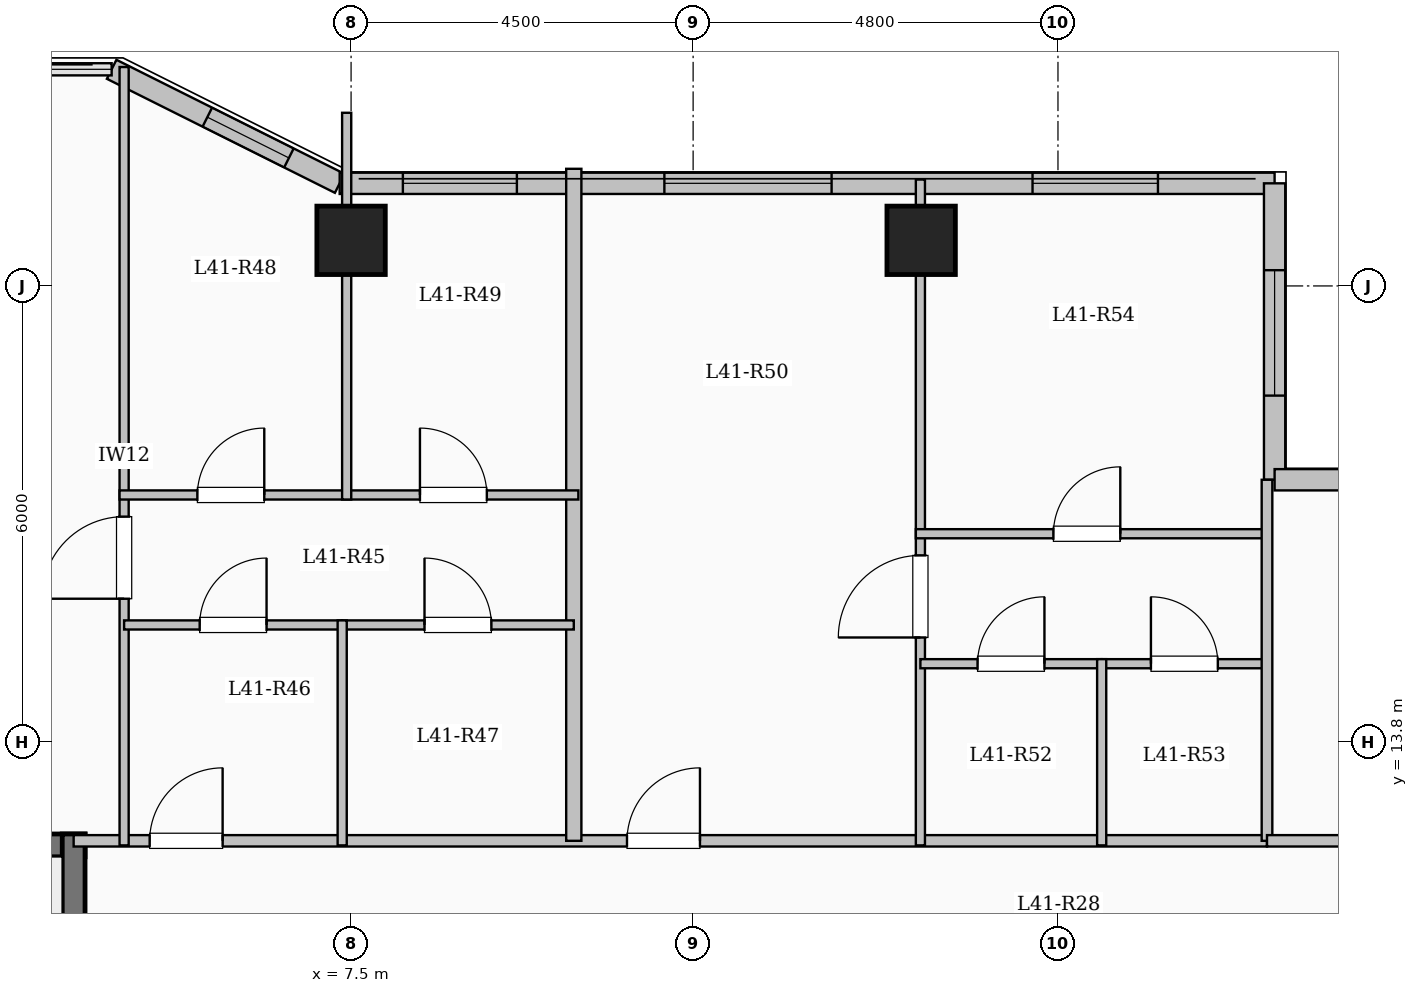
"""IFC4 building model, lengths in metres.
Left out: names, types, materials, properties, quantities, classifications, styles, units other than length and angle.
Written with IfcOpenShell. Run it as: python <this file> out.ifc"""

import sys

from ifc_helpers import new_model, si_unit, direction, frame, frame_2d, origin, origin_2d, place, context, subcontext, project, spatial, rectangle, extrude, element, fill, save


model = new_model("IFC4")
c1 = context("Model", 3, precision=1e-05, world=origin(), true_north=direction((0.0, 1.0)))
c2 = subcontext(c1, "Body", "Model", "MODEL_VIEW")
j1 = project(units=[si_unit("LENGTHUNIT", "METRE"), si_unit("PLANEANGLEUNIT", "RADIAN")], contexts=[c1])
p1 = place(None, origin())
s1 = spatial("IfcSite", under=j1, at=p1, CompositionType="ELEMENT")
p2 = place(p1, origin())
s2 = spatial("IfcBuilding", under=s1, at=p2, CompositionType="ELEMENT")
p3 = place(p2, frame((0.0, 0.0, 152.7)))
s3 = spatial("IfcBuildingStorey", under=s2, at=p3, CompositionType="ELEMENT", Elevation=152.7)
for number, where, z_axis, x_axis in (
    (1, (7.5, 20.4, 0.0), (0.0, 0.0, 1.0), (1.0, 0.0, 0.0)),
    (2, (15.0, 20.4, 0.0), (0.0, 0.0, 1.0), (1.0, 0.0, 0.0)),
):
    element("IfcColumn", number, at=place(p3, frame(where, z_axis=z_axis, x_axis=x_axis)), inside=s3, PredefinedType="COLUMN", context=c2, shape_type="SweptSolid", body=[
        extrude(rectangle(XDim=0.9, YDim=0.9, at=origin_2d()), origin(), (0.0, 0.0, 1.0), 3.35),
    ])
p4 = place(p3, frame((4.35, 22.65, 0.0), z_axis=(0.0, 0.0, 1.0), x_axis=(0.894427191, -0.4472135955, 0.0)))
e3 = element("IfcWall", 3, at=p4, inside=s3, PredefinedType="SOLIDWALL", context=c2, shape_type="SweptSolid", body=[
    extrude(rectangle(XDim=3.354, YDim=0.28, at=frame_2d((1.677, 0.0))), origin(), (0.0, 0.0, 1.0), 3.1),
])
p5 = place(p4, frame((1.407, 0.0, 0.95)))
e4 = element("IfcOpeningElement", 4, at=p5, cuts=e3, PredefinedType="OPENING", context=c2, shape_type="SweptSolid", body=[
    extrude(rectangle(XDim=1.2, YDim=1.5, at=frame_2d((0.6, 0.75))), frame((0.0, 0.15, 0.0), z_axis=(0.0, -1.0, 0.0), x_axis=(1.0, 0.0, 0.0)), (0.0, 0.0, 1.0), 0.3),
])
p6 = place(p3, frame((7.35, 21.15, 0.0), z_axis=(0.0, 0.0, 1.0), x_axis=(1.0, 0.0, 0.0)))
e5 = element("IfcWall", 5, at=p6, inside=s3, PredefinedType="SOLIDWALL", context=c2, shape_type="SweptSolid", body=[
    extrude(rectangle(XDim=12.3, YDim=0.28, at=frame_2d((6.15, 0.0))), origin(), (0.0, 0.0, 1.0), 3.1),
])
p7 = place(p6, frame((0.831, 0.0, 0.9)))
e6 = element("IfcOpeningElement", 6, at=p7, cuts=e5, PredefinedType="OPENING", context=c2, shape_type="SweptSolid", body=[
    extrude(rectangle(XDim=1.5, YDim=1.65, at=frame_2d((0.75, 0.825))), frame((0.0, 0.15, 0.0), z_axis=(0.0, -1.0, 0.0), x_axis=(1.0, 0.0, 0.0)), (0.0, 0.0, 1.0), 0.3),
])
p8 = place(p6, frame((4.272, 0.0, 0.9)))
e7 = element("IfcOpeningElement", 7, at=p8, cuts=e5, PredefinedType="OPENING", context=c2, shape_type="SweptSolid", body=[
    extrude(rectangle(XDim=2.2, YDim=1.75, at=frame_2d((1.1, 0.875))), frame((0.0, 0.15, 0.0), z_axis=(0.0, -1.0, 0.0), x_axis=(1.0, 0.0, 0.0)), (0.0, 0.0, 1.0), 0.3),
])
p9 = place(p6, frame((9.115, 0.0, 0.9)))
e8 = element("IfcOpeningElement", 8, at=p9, cuts=e5, PredefinedType="OPENING", context=c2, shape_type="SweptSolid", body=[
    extrude(rectangle(XDim=1.65, YDim=1.6, at=frame_2d((0.825, 0.8))), frame((0.0, 0.15, 0.0), z_axis=(0.0, -1.0, 0.0), x_axis=(1.0, 0.0, 0.0)), (0.0, 0.0, 1.0), 0.3),
])
p10 = place(p3, frame((19.65, 21.15, 0.0), z_axis=(0.0, 0.0, 1.0), x_axis=(0.0, -1.0, 0.0)))
e9 = element("IfcWall", 9, at=p10, inside=s3, PredefinedType="SOLIDWALL", context=c2, shape_type="SweptSolid", body=[
    extrude(rectangle(XDim=3.9, YDim=0.28, at=frame_2d((1.95, 0.0))), origin(), (0.0, 0.0, 1.0), 3.1),
])
p11 = place(p10, frame((1.143, 0.0, 0.9)))
e10 = element("IfcOpeningElement", 10, at=p11, cuts=e9, PredefinedType="OPENING", context=c2, shape_type="SweptSolid", body=[
    extrude(rectangle(XDim=1.65, YDim=1.6, at=frame_2d((0.825, 0.8))), frame((0.0, 0.15, 0.0), z_axis=(0.0, -1.0, 0.0), x_axis=(1.0, 0.0, 0.0)), (0.0, 0.0, 1.0), 0.3),
])
p12 = place(p3, frame((19.65, 17.25, 0.0), z_axis=(0.0, 0.0, 1.0), x_axis=(1.0, 0.0, 0.0)))
e11 = element("IfcWall", 11, at=p12, inside=s3, PredefinedType="SOLIDWALL", context=c2, shape_type="SweptSolid", body=[
    extrude(rectangle(XDim=5.4, YDim=0.28, at=frame_2d((2.7, 0.0))), origin(), (0.0, 0.0, 1.0), 3.1),
])
p13 = place(p12, frame((1.675, 0.0, 0.9)))
e12 = element("IfcOpeningElement", 12, at=p13, cuts=e11, PredefinedType="OPENING", context=c2, shape_type="SweptSolid", body=[
    extrude(rectangle(XDim=2.0, YDim=1.7, at=frame_2d((1.0, 0.85))), frame((0.0, 0.15, 0.0), z_axis=(0.0, -1.0, 0.0), x_axis=(1.0, 0.0, 0.0)), (0.0, 0.0, 1.0), 0.3),
])
p14 = place(p3, frame((-4.0, 12.44, 0.0), z_axis=(0.0, 0.0, 1.0), x_axis=(1.0, 0.0, 0.0)))
e13 = element("IfcWall", 13, at=p14, inside=s3, PredefinedType="SHEAR", context=c2, shape_type="SweptSolid", body=[
    extrude(rectangle(XDim=8.0, YDim=0.3, at=frame_2d((4.0, 0.0))), origin(), (0.0, 0.0, 1.0), 3.35),
])
p15 = place(p3, frame((3.85, 9.0, 0.0), z_axis=(0.0, 0.0, 1.0), x_axis=(0.0, 1.0, 0.0)))
e14 = element("IfcWall", 14, at=p15, inside=s3, PredefinedType="SHEAR", context=c2, shape_type="SweptSolid", body=[
    extrude(rectangle(XDim=3.59, YDim=0.3, at=frame_2d((1.795, 0.0))), origin(), (0.0, 0.0, 1.0), 3.35),
])
p16 = place(p3, frame((3.85, 12.5, 0.0), z_axis=(0.0, 0.0, 1.0), x_axis=(1.0, 0.0, 0.0)))
e15 = element("IfcWall", 15, at=p16, inside=s3, PredefinedType="PARTITIONING", context=c2, shape_type="SweptSolid", body=[
    extrude(rectangle(XDim=15.7, YDim=0.15, at=frame_2d((7.85, 0.0))), origin(), (0.0, 0.0, 1.0), 3.1),
])
p17 = place(p16, frame((1.0, 0.0, 0.0)))
e16 = element("IfcOpeningElement", 16, at=p17, cuts=e15, PredefinedType="OPENING", context=c2, shape_type="SweptSolid", body=[
    extrude(rectangle(XDim=0.96, YDim=2.15, at=frame_2d((0.48, 1.075))), frame((0.0, 0.085, 0.0), z_axis=(0.0, -1.0, 0.0), x_axis=(1.0, 0.0, 0.0)), (0.0, 0.0, 1.0), 0.17),
])
p18 = place(p16, frame((7.28, 0.0, 0.0)))
e17 = element("IfcOpeningElement", 17, at=p18, cuts=e15, PredefinedType="OPENING", context=c2, shape_type="SweptSolid", body=[
    extrude(rectangle(XDim=0.96, YDim=2.15, at=frame_2d((0.48, 1.075))), frame((0.0, 0.085, 0.0), z_axis=(0.0, -1.0, 0.0), x_axis=(1.0, 0.0, 0.0)), (0.0, 0.0, 1.0), 0.17),
])
p19 = place(p3, frame((10.43, 12.5, 0.0), z_axis=(0.0, 0.0, 1.0), x_axis=(0.0, 1.0, 0.0)))
e18 = element("IfcWall", 18, at=p19, inside=s3, PredefinedType="SOLIDWALL", context=c2, shape_type="SweptSolid", body=[
    extrude(rectangle(XDim=8.841, YDim=0.2, at=frame_2d((4.42, 0.0))), origin(), (0.0, 0.0, 1.0), 3.1),
])
p20 = place(p3, frame((4.514, 12.44, 0.0), z_axis=(0.0, 0.0, 1.0), x_axis=(0.0, 1.0, 0.0)))
e19 = element("IfcWall", 19, at=p20, inside=s3, PredefinedType="PARTITIONING", context=c2, shape_type="SweptSolid", body=[
    extrude(rectangle(XDim=10.24, YDim=0.12, at=frame_2d((5.12, 0.0))), origin(), (0.0, 0.0, 1.0), 3.1),
])
p21 = place(p20, frame((3.245, 0.0, 0.0)))
e20 = element("IfcOpeningElement", 20, at=p21, cuts=e19, PredefinedType="OPENING", context=c2, shape_type="SweptSolid", body=[
    extrude(rectangle(XDim=1.08, YDim=2.15, at=frame_2d((0.54, 1.075))), frame((0.0, 0.07, 0.0), z_axis=(0.0, -1.0, 0.0), x_axis=(1.0, 0.0, 0.0)), (0.0, 0.0, 1.0), 0.14),
])
p22 = place(p3, frame((4.514, 15.34, 0.0), z_axis=(0.0, 0.0, 1.0), x_axis=(1.0, 0.0, 0.0)))
e21 = element("IfcWall", 21, at=p22, inside=s3, PredefinedType="PARTITIONING", context=c2, shape_type="SweptSolid", body=[
    extrude(rectangle(XDim=2.869, YDim=0.12, at=frame_2d((1.435, 0.0))), origin(), (0.0, 0.0, 1.0), 3.1),
])
p23 = place(p22, frame((0.994, 0.0, 0.0)))
e22 = element("IfcOpeningElement", 22, at=p23, cuts=e21, PredefinedType="OPENING", context=c2, shape_type="SweptSolid", body=[
    extrude(rectangle(XDim=0.88, YDim=2.1, at=frame_2d((0.44, 1.05))), frame((0.0, 0.07, 0.0), z_axis=(0.0, -1.0, 0.0), x_axis=(1.0, 0.0, 0.0)), (0.0, 0.0, 1.0), 0.14),
])
p24 = place(p3, frame((7.383, 15.34, 0.0), z_axis=(0.0, 0.0, 1.0), x_axis=(1.0, 0.0, 0.0)))
e23 = element("IfcWall", 23, at=p24, inside=s3, PredefinedType="PARTITIONING", context=c2, shape_type="SweptSolid", body=[
    extrude(rectangle(XDim=3.047, YDim=0.12, at=frame_2d((1.523, 0.0))), origin(), (0.0, 0.0, 1.0), 3.1),
])
p25 = place(p24, frame((1.083, 0.0, 0.0)))
e24 = element("IfcOpeningElement", 24, at=p25, cuts=e23, PredefinedType="OPENING", context=c2, shape_type="SweptSolid", body=[
    extrude(rectangle(XDim=0.88, YDim=2.1, at=frame_2d((0.44, 1.05))), frame((0.0, 0.07, 0.0), z_axis=(0.0, -1.0, 0.0), x_axis=(1.0, 0.0, 0.0)), (0.0, 0.0, 1.0), 0.14),
])
p26 = place(p3, frame((4.454, 17.05, 0.0), z_axis=(0.0, 0.0, 1.0), x_axis=(1.0, 0.0, 0.0)))
e25 = element("IfcWall", 25, at=p26, inside=s3, PredefinedType="PARTITIONING", context=c2, shape_type="SweptSolid", body=[
    extrude(rectangle(XDim=6.036, YDim=0.12, at=frame_2d((3.018, 0.0))), origin(), (0.0, 0.0, 1.0), 2.685),
])
p27 = place(p26, frame((1.024, 0.0, 0.0)))
e26 = element("IfcOpeningElement", 26, at=p27, cuts=e25, PredefinedType="OPENING", context=c2, shape_type="SweptSolid", body=[
    extrude(rectangle(XDim=0.88, YDim=2.1, at=frame_2d((0.44, 1.05))), frame((0.0, 0.07, 0.0), z_axis=(0.0, -1.0, 0.0), x_axis=(1.0, 0.0, 0.0)), (0.0, 0.0, 1.0), 0.14),
])
p28 = place(p26, frame((3.952, 0.0, 0.0)))
e27 = element("IfcOpeningElement", 27, at=p28, cuts=e25, PredefinedType="OPENING", context=c2, shape_type="SweptSolid", body=[
    extrude(rectangle(XDim=0.88, YDim=2.1, at=frame_2d((0.44, 1.05))), frame((0.0, 0.07, 0.0), z_axis=(0.0, -1.0, 0.0), x_axis=(1.0, 0.0, 0.0)), (0.0, 0.0, 1.0), 0.14),
])
p29 = place(p3, frame((7.383, 12.44, 0.0), z_axis=(0.0, 0.0, 1.0), x_axis=(0.0, 1.0, 0.0)))
e28 = element("IfcWall", 28, at=p29, inside=s3, PredefinedType="PARTITIONING", context=c2, shape_type="SweptSolid", body=[
    extrude(rectangle(XDim=2.96, YDim=0.12, at=frame_2d((1.48, 0.0))), origin(), (0.0, 0.0, 1.0), 2.585),
])
p30 = place(p3, frame((7.442, 16.99, 0.0), z_axis=(0.0, 0.0, 1.0), x_axis=(0.0, 1.0, 0.0)))
e29 = element("IfcWall", 29, at=p30, inside=s3, PredefinedType="PARTITIONING", context=c2, shape_type="SweptSolid", body=[
    extrude(rectangle(XDim=5.088, YDim=0.12, at=frame_2d((2.544, 0.0))), origin(), (0.0, 0.0, 1.0), 2.585),
])
p31 = place(p3, frame((14.99, 12.44, 0.0), z_axis=(0.0, 0.0, 1.0), x_axis=(0.0, 1.0, 0.0)))
e30 = element("IfcWall", 30, at=p31, inside=s3, PredefinedType="PARTITIONING", context=c2, shape_type="SweptSolid", body=[
    extrude(rectangle(XDim=8.76, YDim=0.12, at=frame_2d((4.38, 0.0))), origin(), (0.0, 0.0, 1.0), 2.585),
])
p32 = place(p31, frame((2.735, 0.0, 0.0)))
e31 = element("IfcOpeningElement", 31, at=p32, cuts=e30, PredefinedType="OPENING", context=c2, shape_type="SweptSolid", body=[
    extrude(rectangle(XDim=1.08, YDim=2.15, at=frame_2d((0.54, 1.075))), frame((0.0, 0.07, 0.0), z_axis=(0.0, -1.0, 0.0), x_axis=(1.0, 0.0, 0.0)), (0.0, 0.0, 1.0), 0.14),
])
p33 = place(p3, frame((14.99, 14.83, 0.0), z_axis=(0.0, 0.0, 1.0), x_axis=(1.0, 0.0, 0.0)))
e32 = element("IfcWall", 32, at=p33, inside=s3, PredefinedType="PARTITIONING", context=c2, shape_type="SweptSolid", body=[
    extrude(rectangle(XDim=2.385, YDim=0.12, at=frame_2d((1.192, 0.0))), origin(), (0.0, 0.0, 1.0), 3.1),
])
p34 = place(p33, frame((0.752, 0.0, 0.0)))
e33 = element("IfcOpeningElement", 33, at=p34, cuts=e32, PredefinedType="OPENING", context=c2, shape_type="SweptSolid", body=[
    extrude(rectangle(XDim=0.88, YDim=2.1, at=frame_2d((0.44, 1.05))), frame((0.0, 0.07, 0.0), z_axis=(0.0, -1.0, 0.0), x_axis=(1.0, 0.0, 0.0)), (0.0, 0.0, 1.0), 0.14),
])
p35 = place(p3, frame((17.375, 14.83, 0.0), z_axis=(0.0, 0.0, 1.0), x_axis=(1.0, 0.0, 0.0)))
e34 = element("IfcWall", 34, at=p35, inside=s3, PredefinedType="PARTITIONING", context=c2, shape_type="SweptSolid", body=[
    extrude(rectangle(XDim=2.175, YDim=0.12, at=frame_2d((1.087, 0.0))), origin(), (0.0, 0.0, 1.0), 3.1),
])
p36 = place(p35, frame((0.648, 0.0, 0.0)))
e35 = element("IfcOpeningElement", 35, at=p36, cuts=e34, PredefinedType="OPENING", context=c2, shape_type="SweptSolid", body=[
    extrude(rectangle(XDim=0.88, YDim=2.1, at=frame_2d((0.44, 1.05))), frame((0.0, 0.07, 0.0), z_axis=(0.0, -1.0, 0.0), x_axis=(1.0, 0.0, 0.0)), (0.0, 0.0, 1.0), 0.14),
])
p37 = place(p3, frame((14.93, 16.54, 0.0), z_axis=(0.0, 0.0, 1.0), x_axis=(1.0, 0.0, 0.0)))
e36 = element("IfcWall", 36, at=p37, inside=s3, PredefinedType="PARTITIONING", context=c2, shape_type="SweptSolid", body=[
    extrude(rectangle(XDim=4.68, YDim=0.12, at=frame_2d((2.34, 0.0))), origin(), (0.0, 0.0, 1.0), 3.1),
])
p38 = place(p37, frame((1.81, 0.0, 0.0)))
e37 = element("IfcOpeningElement", 37, at=p38, cuts=e36, PredefinedType="OPENING", context=c2, shape_type="SweptSolid", body=[
    extrude(rectangle(XDim=0.88, YDim=2.1, at=frame_2d((0.44, 1.05))), frame((0.0, 0.07, 0.0), z_axis=(0.0, -1.0, 0.0), x_axis=(1.0, 0.0, 0.0)), (0.0, 0.0, 1.0), 0.14),
])
p39 = place(p3, frame((17.375, 12.44, 0.0), z_axis=(0.0, 0.0, 1.0), x_axis=(0.0, 1.0, 0.0)))
e38 = element("IfcWall", 38, at=p39, inside=s3, PredefinedType="PARTITIONING", context=c2, shape_type="SweptSolid", body=[
    extrude(rectangle(XDim=2.45, YDim=0.12, at=frame_2d((1.225, 0.0))), origin(), (0.0, 0.0, 1.0), 3.1),
])
p40 = place(p3, frame((19.55, 12.5, 0.0), z_axis=(0.0, 0.0, 1.0), x_axis=(0.0, 1.0, 0.0)))
e39 = element("IfcWall", 39, at=p40, inside=s3, PredefinedType="PARTITIONING", context=c2, shape_type="SweptSolid", body=[
    extrude(rectangle(XDim=4.75, YDim=0.14, at=frame_2d((2.375, 0.0))), origin(), (0.0, 0.0, 1.0), 3.1),
])
p41 = place(p3, frame((19.55, 12.5, 0.0), z_axis=(0.0, 0.0, 1.0), x_axis=(1.0, 0.0, 0.0)))
e40 = element("IfcWall", 40, at=p41, inside=s3, PredefinedType="PARTITIONING", context=c2, shape_type="SweptSolid", body=[
    extrude(rectangle(XDim=5.53, YDim=0.15, at=frame_2d((2.765, 0.0))), origin(), (0.0, 0.0, 1.0), 3.1),
])
p42 = place(p41, frame((2.29, 0.0, 0.0)))
e41 = element("IfcOpeningElement", 41, at=p42, cuts=e40, PredefinedType="OPENING", context=c2, shape_type="SweptSolid", body=[
    extrude(rectangle(XDim=0.95, YDim=2.15, at=frame_2d((0.475, 1.075))), frame((0.0, 0.085, 0.0), z_axis=(0.0, -1.0, 0.0), x_axis=(1.0, 0.0, 0.0)), (0.0, 0.0, 1.0), 0.17),
])
p43 = place(p5, origin())
e42 = element("IfcWindow", 42, at=p43, inside=s3, PartitioningType="SINGLE_PANEL", PredefinedType="WINDOW", context=c2, shape_type="SweptSolid", body=[
    extrude(rectangle(XDim=1.2, YDim=1.5, at=frame_2d((0.6, 0.75))), frame((0.0, 0.03, 0.0), z_axis=(0.0, -1.0, 0.0), x_axis=(1.0, 0.0, 0.0)), (0.0, 0.0, 1.0), 0.06),
])
fill(e4, e42)
p44 = place(p7, origin())
e43 = element("IfcWindow", 43, at=p44, inside=s3, PartitioningType="SINGLE_PANEL", PredefinedType="WINDOW", context=c2, shape_type="SweptSolid", body=[
    extrude(rectangle(XDim=1.5, YDim=1.65, at=frame_2d((0.75, 0.825))), frame((0.0, 0.03, 0.0), z_axis=(0.0, -1.0, 0.0), x_axis=(1.0, 0.0, 0.0)), (0.0, 0.0, 1.0), 0.06),
])
fill(e6, e43)
p45 = place(p8, origin())
e44 = element("IfcWindow", 44, at=p45, inside=s3, PartitioningType="SINGLE_PANEL", PredefinedType="WINDOW", context=c2, shape_type="SweptSolid", body=[
    extrude(rectangle(XDim=2.2, YDim=1.75, at=frame_2d((1.1, 0.875))), frame((0.0, 0.03, 0.0), z_axis=(0.0, -1.0, 0.0), x_axis=(1.0, 0.0, 0.0)), (0.0, 0.0, 1.0), 0.06),
])
fill(e7, e44)
p46 = place(p9, origin())
e45 = element("IfcWindow", 45, at=p46, inside=s3, PartitioningType="SINGLE_PANEL", PredefinedType="WINDOW", context=c2, shape_type="SweptSolid", body=[
    extrude(rectangle(XDim=1.65, YDim=1.6, at=frame_2d((0.825, 0.8))), frame((0.0, 0.03, 0.0), z_axis=(0.0, -1.0, 0.0), x_axis=(1.0, 0.0, 0.0)), (0.0, 0.0, 1.0), 0.06),
])
fill(e8, e45)
p47 = place(p11, origin())
e46 = element("IfcWindow", 46, at=p47, inside=s3, PartitioningType="SINGLE_PANEL", PredefinedType="WINDOW", context=c2, shape_type="SweptSolid", body=[
    extrude(rectangle(XDim=1.65, YDim=1.6, at=frame_2d((0.825, 0.8))), frame((0.0, 0.03, 0.0), z_axis=(0.0, -1.0, 0.0), x_axis=(1.0, 0.0, 0.0)), (0.0, 0.0, 1.0), 0.06),
])
fill(e10, e46)
p48 = place(p17, origin())
e47 = element("IfcDoor", 47, at=p48, inside=s3, OperationType="SINGLE_SWING_RIGHT", PredefinedType="DOOR", context=c2, shape_type="SweptSolid", body=[
    extrude(rectangle(XDim=0.96, YDim=2.15, at=frame_2d((0.48, 1.075))), frame((0.0, 0.025, 0.0), z_axis=(0.0, -1.0, 0.0), x_axis=(1.0, 0.0, 0.0)), (0.0, 0.0, 1.0), 0.05),
])
fill(e16, e47)
p49 = place(p21, origin())
e48 = element("IfcDoor", 48, at=p49, inside=s3, OperationType="SINGLE_SWING_LEFT", PredefinedType="DOOR", context=c2, shape_type="SweptSolid", body=[
    extrude(rectangle(XDim=1.08, YDim=2.15, at=frame_2d((0.54, 1.075))), frame((0.0, 0.025, 0.0), z_axis=(0.0, -1.0, 0.0), x_axis=(1.0, 0.0, 0.0)), (0.0, 0.0, 1.0), 0.05),
])
fill(e20, e48)
p50 = place(p23, origin())
e49 = element("IfcDoor", 49, at=p50, inside=s3, OperationType="SINGLE_SWING_RIGHT", PredefinedType="DOOR", context=c2, shape_type="SweptSolid", body=[
    extrude(rectangle(XDim=0.88, YDim=2.1, at=frame_2d((0.44, 1.05))), frame((0.0, 0.025, 0.0), z_axis=(0.0, -1.0, 0.0), x_axis=(1.0, 0.0, 0.0)), (0.0, 0.0, 1.0), 0.05),
])
fill(e22, e49)
p51 = place(p25, origin())
e50 = element("IfcDoor", 50, at=p51, inside=s3, OperationType="SINGLE_SWING_LEFT", PredefinedType="DOOR", context=c2, shape_type="SweptSolid", body=[
    extrude(rectangle(XDim=0.88, YDim=2.1, at=frame_2d((0.44, 1.05))), frame((0.0, 0.025, 0.0), z_axis=(0.0, -1.0, 0.0), x_axis=(1.0, 0.0, 0.0)), (0.0, 0.0, 1.0), 0.05),
])
fill(e24, e50)
p52 = place(p27, origin())
e51 = element("IfcDoor", 51, at=p52, inside=s3, OperationType="SINGLE_SWING_RIGHT", PredefinedType="DOOR", context=c2, shape_type="SweptSolid", body=[
    extrude(rectangle(XDim=0.88, YDim=2.1, at=frame_2d((0.44, 1.05))), frame((0.0, 0.025, 0.0), z_axis=(0.0, -1.0, 0.0), x_axis=(1.0, 0.0, 0.0)), (0.0, 0.0, 1.0), 0.05),
])
fill(e26, e51)
p53 = place(p28, origin())
e52 = element("IfcDoor", 52, at=p53, inside=s3, OperationType="SINGLE_SWING_LEFT", PredefinedType="DOOR", context=c2, shape_type="SweptSolid", body=[
    extrude(rectangle(XDim=0.88, YDim=2.1, at=frame_2d((0.44, 1.05))), frame((0.0, 0.025, 0.0), z_axis=(0.0, -1.0, 0.0), x_axis=(1.0, 0.0, 0.0)), (0.0, 0.0, 1.0), 0.05),
])
fill(e27, e52)
p54 = place(p18, origin())
e53 = element("IfcDoor", 53, at=p54, inside=s3, OperationType="SINGLE_SWING_RIGHT", PredefinedType="DOOR", context=c2, shape_type="SweptSolid", body=[
    extrude(rectangle(XDim=0.96, YDim=2.15, at=frame_2d((0.48, 1.075))), frame((0.0, 0.025, 0.0), z_axis=(0.0, -1.0, 0.0), x_axis=(1.0, 0.0, 0.0)), (0.0, 0.0, 1.0), 0.05),
])
fill(e17, e53)
p55 = place(p32, origin())
e54 = element("IfcDoor", 54, at=p55, inside=s3, OperationType="SINGLE_SWING_LEFT", PredefinedType="DOOR", context=c2, shape_type="SweptSolid", body=[
    extrude(rectangle(XDim=1.08, YDim=2.15, at=frame_2d((0.54, 1.075))), frame((0.0, 0.025, 0.0), z_axis=(0.0, -1.0, 0.0), x_axis=(1.0, 0.0, 0.0)), (0.0, 0.0, 1.0), 0.05),
])
fill(e31, e54)
p56 = place(p34, origin())
e55 = element("IfcDoor", 55, at=p56, inside=s3, OperationType="SINGLE_SWING_RIGHT", PredefinedType="DOOR", context=c2, shape_type="SweptSolid", body=[
    extrude(rectangle(XDim=0.88, YDim=2.1, at=frame_2d((0.44, 1.05))), frame((0.0, 0.025, 0.0), z_axis=(0.0, -1.0, 0.0), x_axis=(1.0, 0.0, 0.0)), (0.0, 0.0, 1.0), 0.05),
])
fill(e33, e55)
p57 = place(p36, origin())
e56 = element("IfcDoor", 56, at=p57, inside=s3, OperationType="SINGLE_SWING_LEFT", PredefinedType="DOOR", context=c2, shape_type="SweptSolid", body=[
    extrude(rectangle(XDim=0.88, YDim=2.1, at=frame_2d((0.44, 1.05))), frame((0.0, 0.025, 0.0), z_axis=(0.0, -1.0, 0.0), x_axis=(1.0, 0.0, 0.0)), (0.0, 0.0, 1.0), 0.05),
])
fill(e35, e56)
p58 = place(p38, origin())
e57 = element("IfcDoor", 57, at=p58, inside=s3, OperationType="SINGLE_SWING_RIGHT", PredefinedType="DOOR", context=c2, shape_type="SweptSolid", body=[
    extrude(rectangle(XDim=0.88, YDim=2.1, at=frame_2d((0.44, 1.05))), frame((0.0, 0.025, 0.0), z_axis=(0.0, -1.0, 0.0), x_axis=(1.0, 0.0, 0.0)), (0.0, 0.0, 1.0), 0.05),
])
fill(e37, e57)
save(model, sys.argv[1])
